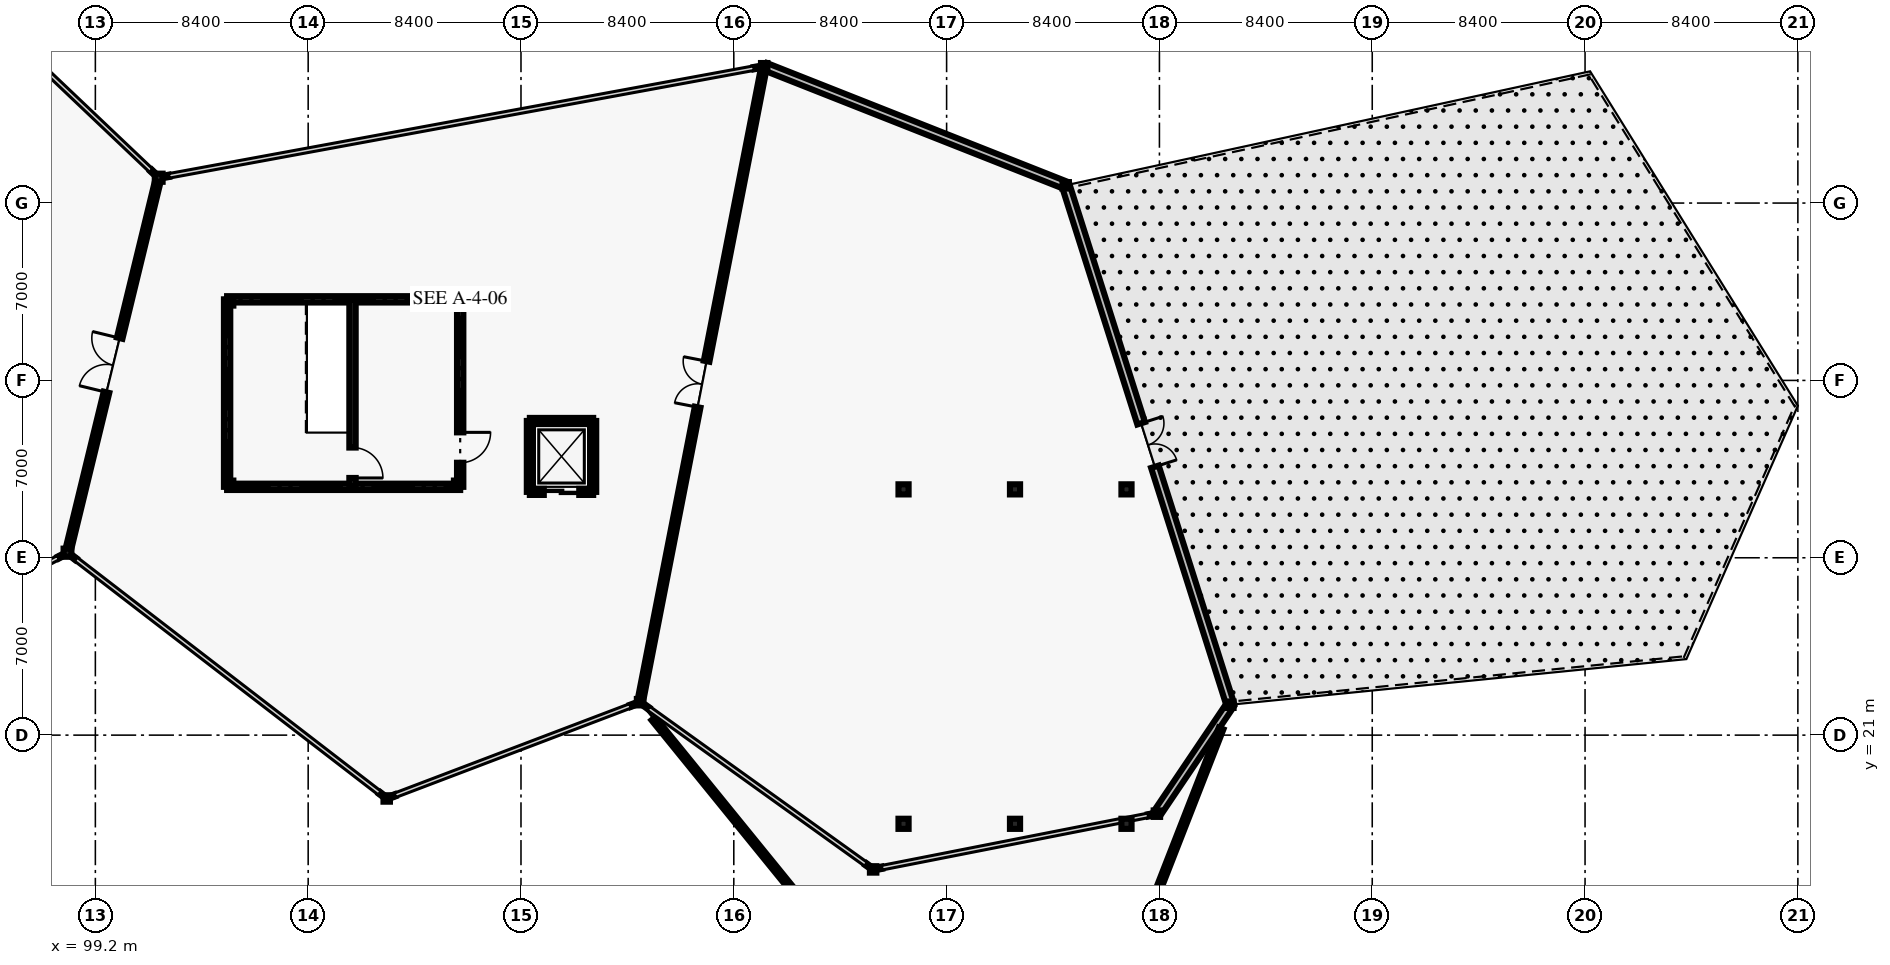
"""IFC4 building model, lengths in metres.
Left out: names, types, materials, properties, quantities, classifications, styles, units other than length and angle.
Written with IfcOpenShell. Run it as: python <this file> out.ifc"""

import sys

from ifc_helpers import new_model, si_unit, direction, frame, frame_2d, origin, origin_2d, place, context, subcontext, project, spatial, rectangle, i_section, extrude, element, fill, save


model = new_model("IFC4")
c1 = context("Model", 3, precision=1e-05, world=origin(), true_north=direction((0.0, 1.0)))
c2 = subcontext(c1, "Body", "Model", "MODEL_VIEW")
j1 = project(units=[si_unit("LENGTHUNIT", "METRE"), si_unit("PLANEANGLEUNIT", "RADIAN")], contexts=[c1])
p1 = place(None, origin())
s1 = spatial("IfcSite", under=j1, at=p1, CompositionType="ELEMENT")
p2 = place(p1, origin())
s2 = spatial("IfcBuilding", under=s1, at=p2, CompositionType="ELEMENT")
p3 = place(p2, frame((0.0, 0.0, 15.0)))
s3 = spatial("IfcBuildingStorey", under=s2, at=p3, CompositionType="ELEMENT", Elevation=15.0)
for number, where, z_axis, x_axis in (
    (1, (98.1, 28.2, 0.0), (0.0, 0.0, 1.0), (1.0, 0.0, 0.0)),
    (2, (101.7, 43.0, 0.0), (0.0, 0.0, 1.0), (1.0, 0.0, 0.0)),
):
    element("IfcColumn", number, at=place(p3, frame(where, z_axis=z_axis, x_axis=x_axis)), inside=s3, PredefinedType="COLUMN", context=c2, shape_type="SweptSolid", body=[
        extrude(i_section(OverallWidth=0.309, OverallDepth=0.321, WebThickness=0.014, FlangeThickness=0.022, FilletRadius=0.017, at=origin_2d()), origin(), (0.0, 0.0, 1.0), 4.8),
    ])
for number, where, z_axis, x_axis in (
    (3, (110.7, 18.5, 0.0), (0.0, 0.0, 1.0), (1.0, 0.0, 0.0)),
    (4, (120.7, 22.3, 0.0), (0.0, 0.0, 1.0), (1.0, 0.0, 0.0)),
    (5, (125.6, 47.4, 0.0), (0.0, 0.0, 1.0), (1.0, 0.0, 0.0)),
    (6, (129.9, 15.7, 0.0), (0.0, 0.0, 1.0), (1.0, 0.0, 0.0)),
    (7, (137.5, 42.7, 0.0), (0.0, 0.0, 1.0), (1.0, 0.0, 0.0)),
    (8, (141.1, 17.9, 0.0), (0.0, 0.0, 1.0), (1.0, 0.0, 0.0)),
    (9, (144.0, 22.2, 0.0), (0.0, 0.0, 1.0), (1.0, 0.0, 0.0)),
):
    element("IfcColumn", number, at=place(p3, frame(where, z_axis=z_axis, x_axis=x_axis)), inside=s3, PredefinedType="COLUMN", context=c2, shape_type="SweptSolid", body=[
        extrude(i_section(OverallWidth=0.254, OverallDepth=0.254, WebThickness=0.009, FlangeThickness=0.014, FilletRadius=0.013, at=origin_2d()), origin(), (0.0, 0.0, 1.0), 4.8),
    ])
for number, where, z_axis, x_axis in (
    (10, (131.1, 17.5, 0.0), (0.0, 0.0, 1.0), (1.0, 0.0, 0.0)),
    (11, (131.1, 30.7, 0.0), (0.0, 0.0, 1.0), (1.0, 0.0, 0.0)),
    (12, (135.5, 17.5, 0.0), (0.0, 0.0, 1.0), (1.0, 0.0, 0.0)),
    (13, (135.5, 30.7, 0.0), (0.0, 0.0, 1.0), (1.0, 0.0, 0.0)),
    (14, (139.9, 17.5, 0.0), (0.0, 0.0, 1.0), (1.0, 0.0, 0.0)),
    (15, (139.9, 30.7, 0.0), (0.0, 0.0, 1.0), (1.0, 0.0, 0.0)),
):
    element("IfcColumn", number, at=place(p3, frame(where, z_axis=z_axis, x_axis=x_axis)), inside=s3, PredefinedType="COLUMN", context=c2, shape_type="SweptSolid", body=[
        extrude(i_section(OverallWidth=0.4, OverallDepth=0.4, WebThickness=0.022, FlangeThickness=0.036, at=origin_2d()), origin(), (0.0, 0.0, 1.0), 4.8),
    ])
for number, where, z_axis, x_axis in (
    (16, (104.52, 30.92, 0.0), (0.0, 0.0, 1.0), (1.0, 0.0, 0.0)),
    (17, (113.48, 30.92, 0.0), (0.0, 0.0, 1.0), (1.0, 0.0, 0.0)),
    (18, (113.48, 38.08, 0.0), (0.0, 0.0, 1.0), (1.0, 0.0, 0.0)),
    (19, (104.52, 38.08, 0.0), (0.0, 0.0, 1.0), (1.0, 0.0, 0.0)),
):
    element("IfcColumn", number, at=place(p3, frame(where, z_axis=z_axis, x_axis=x_axis)), inside=s3, PredefinedType="COLUMN", context=c2, shape_type="SweptSolid", body=[
        extrude(i_section(OverallWidth=0.254, OverallDepth=0.254, WebThickness=0.009, FlangeThickness=0.014, FilletRadius=0.013, at=origin_2d()), origin(), (0.0, 0.0, 1.0), 4.8),
    ])
p4 = place(p3, frame((98.01, 28.152, 0.0), z_axis=(0.0, 0.0, 1.0), x_axis=(-0.885021600209, -0.465549962049, 0.0)))
e20 = element("IfcWall", 20, at=p4, inside=s3, PredefinedType="SOLIDWALL", context=c2, shape_type="SweptSolid", body=[
    extrude(rectangle(XDim=0.307, YDim=0.095, at=frame_2d((0.154, 0.0))), origin(), (0.0, 0.0, 1.0), 3.62),
])
p5 = place(p3, frame((101.403, 43.282, 0.0), z_axis=(0.0, 0.0, 1.0), x_axis=(0.726243974232, -0.687437044311, 0.0)))
e21 = element("IfcWall", 21, at=p5, inside=s3, PredefinedType="SOLIDWALL", context=c2, shape_type="SweptSolid", body=[
    extrude(rectangle(XDim=0.308, YDim=0.095, at=frame_2d((0.154, 0.0))), origin(), (0.0, 0.0, 1.0), 3.62),
])
p6 = place(p3, frame((110.667, 18.526, 0.0), z_axis=(0.0, 0.0, 1.0), x_axis=(-0.79356800352, 0.608481572268, 0.0)))
e22 = element("IfcWall", 22, at=p6, inside=s3, PredefinedType="SOLIDWALL", context=c2, shape_type="SweptSolid", body=[
    extrude(rectangle(XDim=0.307, YDim=0.095, at=frame_2d((0.154, 0.0))), origin(), (0.0, 0.0, 1.0), 3.62),
])
p7 = place(p3, frame((98.424, 27.95, 0.0), z_axis=(0.0, 0.0, 1.0), x_axis=(-0.793861838141, 0.608098168016, 0.0)))
e23 = element("IfcWall", 23, at=p7, inside=s3, PredefinedType="SOLIDWALL", context=c2, shape_type="SweptSolid", body=[
    extrude(rectangle(XDim=0.308, YDim=0.095, at=frame_2d((0.154, 0.0))), origin(), (0.0, 0.0, 1.0), 3.62),
])
p8 = place(p3, frame((120.605, 22.264, 0.0), z_axis=(0.0, 0.0, 1.0), x_axis=(-0.935413842844, -0.353554723651, 0.0)))
e24 = element("IfcWall", 24, at=p8, inside=s3, PredefinedType="SOLIDWALL", context=c2, shape_type="SweptSolid", body=[
    extrude(rectangle(XDim=0.308, YDim=0.095, at=frame_2d((0.154, 0.0))), origin(), (0.0, 0.0, 1.0), 3.62),
])
p9 = place(p3, frame((111.027, 18.624, 0.0), z_axis=(0.0, 0.0, 1.0), x_axis=(-0.935151489811, -0.354248064361, 0.0)))
e25 = element("IfcWall", 25, at=p9, inside=s3, PredefinedType="SOLIDWALL", context=c2, shape_type="SweptSolid", body=[
    extrude(rectangle(XDim=0.308, YDim=0.095, at=frame_2d((0.154, 0.0))), origin(), (0.0, 0.0, 1.0), 3.62),
])
for number, where, z_axis, x_axis in (
    (26, (101.8, 43.019, 0.0), (0.0, 0.0, 1.0), (0.984, 0.178, 0.0)),
    (27, (125.193, 47.325, 0.0), (0.0, 0.0, 1.0), (0.984, 0.178, 0.0)),
):
    element("IfcWall", number, at=place(p3, frame(where, z_axis=z_axis, x_axis=x_axis)), inside=s3, PredefinedType="SOLIDWALL", context=c2, shape_type="SweptSolid", body=[
        extrude(rectangle(XDim=0.308, YDim=0.095, at=frame_2d((0.154, 0.0))), origin(), (0.0, 0.0, 1.0), 3.62),
    ])
p10 = place(p3, frame((125.657, 47.378, 0.0), z_axis=(0.0, 0.0, 1.0), x_axis=(0.930071968125, -0.367377372884, 0.0)))
e28 = element("IfcWall", 28, at=p10, inside=s3, PredefinedType="SOLIDWALL", context=c2, shape_type="SweptSolid", body=[
    extrude(rectangle(XDim=12.733, YDim=0.315, at=frame_2d((6.367, 0.0))), origin(), (0.0, 0.0, 1.0), 3.62),
])
for number, where, z_axis, x_axis in (
    (29, (129.866, 15.724, 0.0), (0.0, 0.0, 1.0), (-0.812, 0.584, 0.0)),
    (30, (121.033, 22.061, 0.0), (0.0, 0.0, 1.0), (-0.812, 0.584, 0.0)),
):
    element("IfcWall", number, at=place(p3, frame(where, z_axis=z_axis, x_axis=x_axis)), inside=s3, PredefinedType="SOLIDWALL", context=c2, shape_type="SweptSolid", body=[
        extrude(rectangle(XDim=0.308, YDim=0.095, at=frame_2d((0.154, 0.0))), origin(), (0.0, 0.0, 1.0), 3.62),
    ])
for number, where, z_axis, x_axis in (
    (31, (141.059, 17.892, 0.0), (0.0, 0.0, 1.0), (-0.981, -0.192, 0.0)),
    (32, (130.243, 15.767, 0.0), (0.0, 0.0, 1.0), (-0.981, -0.192, 0.0)),
):
    element("IfcWall", number, at=place(p3, frame(where, z_axis=z_axis, x_axis=x_axis)), inside=s3, PredefinedType="SOLIDWALL", context=c2, shape_type="SweptSolid", body=[
        extrude(rectangle(XDim=0.308, YDim=0.095, at=frame_2d((0.154, 0.0))), origin(), (0.0, 0.0, 1.0), 3.62),
    ])
p11 = place(p3, frame((144.0, 22.2, 0.0), z_axis=(0.0, 0.0, 1.0), x_axis=(-0.559124361662, -0.829083800467, 0.0)))
e33 = element("IfcWall", 33, at=p11, inside=s3, PredefinedType="SOLIDWALL", context=c2, shape_type="SweptSolid", body=[
    extrude(rectangle(XDim=5.187, YDim=0.315, at=frame_2d((2.593, 0.0))), origin(), (0.0, 0.0, 1.0), 3.62),
])
p12 = place(p3, frame((137.5, 42.7, 0.0), z_axis=(0.0, 0.0, 1.0), x_axis=(0.302243860734, -0.953230637699, 0.0)))
e34 = element("IfcWall", 34, at=p12, inside=s3, PredefinedType="SOLIDWALL", context=c2, shape_type="SweptSolid", body=[
    extrude(rectangle(XDim=21.506, YDim=0.315, at=frame_2d((10.753, 0.0))), origin(), (0.0, 0.0, 1.0), 3.62),
])
p13 = place(p12, frame((9.853, 0.0, 0.0)))
e35 = element("IfcOpeningElement", 35, at=p13, cuts=e34, PredefinedType="OPENING", context=c2, shape_type="SweptSolid", body=[
    extrude(rectangle(XDim=1.8, YDim=2.25, at=frame_2d((0.9, 1.125))), frame((0.0, 0.167, 0.0), z_axis=(0.0, -1.0, 0.0), x_axis=(1.0, 0.0, 0.0)), (0.0, 0.0, 1.0), 0.335),
])
p14 = place(p3, frame((131.1, 9.5, 0.0), z_axis=(0.0, 0.0, 1.0), x_axis=(-0.630610236669, 0.776099690381, 0.0)))
e36 = element("IfcWall", 36, at=p14, inside=s3, PredefinedType="PARAPET", context=c2, shape_type="SweptSolid", body=[
    extrude(rectangle(XDim=15.656, YDim=0.195, at=frame_2d((7.828, 0.0))), origin(), (0.0, 0.0, 1.0), 0.95),
])
p15 = place(p3, frame((143.635, 21.265, 0.0), z_axis=(0.0, 0.0, 1.0), x_axis=(-0.363749317011, -0.931496878349, 0.0)))
e37 = element("IfcWall", 37, at=p15, inside=s3, PredefinedType="PARAPET", context=c2, shape_type="SweptSolid", body=[
    extrude(rectangle(XDim=10.268, YDim=0.195, at=frame_2d((5.134, 0.0))), origin(), (0.0, 0.0, 1.0), 0.95),
])
p16 = place(p3, frame((98.1, 28.2, 0.0), z_axis=(0.0, 0.0, 1.0), x_axis=(0.236341762997, 0.971669990822, 0.0)))
e38 = element("IfcWall", 38, at=p16, inside=s3, PredefinedType="SOLIDWALL", context=c2, shape_type="SweptSolid", body=[
    extrude(rectangle(XDim=15.231, YDim=0.225, at=frame_2d((7.616, 0.0))), origin(), (0.0, 0.0, 1.0), 4.02),
])
p17 = place(p16, frame((6.516, 0.0, 0.0)))
e39 = element("IfcOpeningElement", 39, at=p17, cuts=e38, PredefinedType="OPENING", context=c2, shape_type="SweptSolid", body=[
    extrude(rectangle(XDim=2.2, YDim=2.6, at=frame_2d((1.1, 1.3))), frame((0.0, 0.123, 0.0), z_axis=(0.0, -1.0, 0.0), x_axis=(1.0, 0.0, 0.0)), (0.0, 0.0, 1.0), 0.245),
])
p18 = place(p3, frame((120.7, 22.3, 0.0), z_axis=(0.0, 0.0, 1.0), x_axis=(0.191608827438, 0.981471373626, 0.0)))
e40 = element("IfcWall", 40, at=p18, inside=s3, PredefinedType="SOLIDWALL", context=c2, shape_type="SweptSolid", body=[
    extrude(rectangle(XDim=25.574, YDim=0.225, at=frame_2d((12.787, 0.0))), origin(), (0.0, 0.0, 1.0), 4.02),
])
p19 = place(p18, frame((11.862, 0.0, 0.0)))
e41 = element("IfcOpeningElement", 41, at=p19, cuts=e40, PredefinedType="OPENING", context=c2, shape_type="SweptSolid", body=[
    extrude(rectangle(XDim=1.85, YDim=2.4, at=frame_2d((0.925, 1.2))), frame((0.0, 0.123, 0.0), z_axis=(0.0, -1.0, 0.0), x_axis=(1.0, 0.0, 0.0)), (0.0, 0.0, 1.0), 0.245),
])
p20 = place(p3, frame((104.4, 30.8, 0.0), z_axis=(0.0, 0.0, 1.0), x_axis=(0.0, 1.0, 0.0)))
e42 = element("IfcWall", 42, at=p20, inside=s3, PredefinedType="SHEAR", context=c2, shape_type="SweptSolid", body=[
    extrude(rectangle(XDim=7.4, YDim=0.25, at=frame_2d((3.7, 0.0))), origin(), (0.0, 0.0, 1.0), 4.56),
])
for number, where, z_axis, x_axis in (
    (43, (104.4, 38.2, 0.0), (0.0, 0.0, 1.0), (1.0, 0.0, 0.0)),
    (44, (113.6, 30.8, 0.0), (0.0, 0.0, 1.0), (-1.0, 0.0, 0.0)),
):
    element("IfcWall", number, at=place(p3, frame(where, z_axis=z_axis, x_axis=x_axis)), inside=s3, PredefinedType="SHEAR", context=c2, shape_type="SweptSolid", body=[
        extrude(rectangle(XDim=9.2, YDim=0.25, at=frame_2d((4.6, 0.0))), origin(), (0.0, 0.0, 1.0), 4.56),
    ])
p21 = place(p3, frame((113.6, 38.2, 0.0), z_axis=(0.0, 0.0, 1.0), x_axis=(0.0, -1.0, 0.0)))
e45 = element("IfcWall", 45, at=p21, inside=s3, PredefinedType="SHEAR", context=c2, shape_type="SweptSolid", body=[
    extrude(rectangle(XDim=7.4, YDim=0.25, at=frame_2d((3.7, 0.0))), origin(), (0.0, 0.0, 1.0), 4.56),
])
p22 = place(p21, frame((5.25, 0.0, 0.0)))
e46 = element("IfcOpeningElement", 46, at=p22, cuts=e45, PredefinedType="OPENING", context=c2, shape_type="SweptSolid", body=[
    extrude(rectangle(XDim=1.2, YDim=2.2, at=frame_2d((0.6, 1.1))), frame((0.0, 0.135, 0.0), z_axis=(0.0, -1.0, 0.0), x_axis=(1.0, 0.0, 0.0)), (0.0, 0.0, 1.0), 0.27),
])
p23 = place(p3, frame((109.35, 38.2, 0.0), z_axis=(0.0, 0.0, 1.0), x_axis=(0.0, -1.0, 0.0)))
e47 = element("IfcWall", 47, at=p23, inside=s3, PredefinedType="SHEAR", context=c2, shape_type="SweptSolid", body=[
    extrude(rectangle(XDim=7.4, YDim=0.25, at=frame_2d((3.7, 0.0))), origin(), (0.0, 0.0, 1.0), 4.56),
])
p24 = place(p23, frame((5.85, 0.0, 0.0)))
e48 = element("IfcOpeningElement", 48, at=p24, cuts=e47, PredefinedType="OPENING", context=c2, shape_type="SweptSolid", body=[
    extrude(rectangle(XDim=1.2, YDim=2.2, at=frame_2d((0.6, 1.1))), frame((0.0, 0.135, 0.0), z_axis=(0.0, -1.0, 0.0), x_axis=(1.0, 0.0, 0.0)), (0.0, 0.0, 1.0), 0.27),
])
p25 = place(p3, frame((116.35, 33.4, 0.0), z_axis=(0.0, 0.0, 1.0), x_axis=(1.0, 0.0, 0.0)))
e49 = element("IfcWall", 49, at=p25, inside=s3, PredefinedType="SHEAR", context=c2, shape_type="SweptSolid", body=[
    extrude(rectangle(XDim=2.5, YDim=0.24, at=frame_2d((1.25, 0.0))), origin(), (0.0, 0.0, 1.0), 5.9),
])
for number, where, z_axis, x_axis in (
    (50, (118.85, 33.4, 0.0), (0.0, 0.0, 1.0), (0.0, -1.0, 0.0)),
    (51, (116.35, 30.6, 0.0), (0.0, 0.0, 1.0), (0.0, 1.0, 0.0)),
):
    element("IfcWall", number, at=place(p3, frame(where, z_axis=z_axis, x_axis=x_axis)), inside=s3, PredefinedType="SHEAR", context=c2, shape_type="SweptSolid", body=[
        extrude(rectangle(XDim=2.8, YDim=0.24, at=frame_2d((1.4, 0.0))), origin(), (0.0, 0.0, 1.0), 5.9),
    ])
p26 = place(p3, frame((118.85, 30.6, 0.0), z_axis=(0.0, 0.0, 1.0), x_axis=(-1.0, 0.0, 0.0)))
e52 = element("IfcWall", 52, at=p26, inside=s3, PredefinedType="SHEAR", context=c2, shape_type="SweptSolid", body=[
    extrude(rectangle(XDim=2.5, YDim=0.24, at=frame_2d((1.25, 0.0))), origin(), (0.0, 0.0, 1.0), 5.9),
])
p27 = place(p26, frame((0.55, 0.0, 0.0)))
e53 = element("IfcOpeningElement", 53, at=p27, cuts=e52, PredefinedType="OPENING", context=c2, shape_type="SweptSolid", body=[
    extrude(rectangle(XDim=1.4, YDim=2.3, at=frame_2d((0.7, 1.15))), frame((0.0, 0.13, 0.0), z_axis=(0.0, -1.0, 0.0), x_axis=(1.0, 0.0, 0.0)), (0.0, 0.0, 1.0), 0.26),
])
p28 = place(p13, origin())
e54 = element("IfcDoor", 54, at=p28, inside=s3, OperationType="DOUBLE_DOOR_SINGLE_SWING", PredefinedType="DOOR", context=c2, shape_type="SweptSolid", body=[
    extrude(rectangle(XDim=1.8, YDim=2.25, at=frame_2d((0.9, 1.125))), frame((0.0, 0.025, 0.0), z_axis=(0.0, -1.0, 0.0), x_axis=(1.0, 0.0, 0.0)), (0.0, 0.0, 1.0), 0.05),
])
fill(e35, e54)
p29 = place(p17, origin())
e55 = element("IfcDoor", 55, at=p29, inside=s3, OperationType="DOUBLE_DOOR_SINGLE_SWING", PredefinedType="DOOR", context=c2, shape_type="SweptSolid", body=[
    extrude(rectangle(XDim=2.2, YDim=2.6, at=frame_2d((1.1, 1.3))), frame((0.0, 0.025, 0.0), z_axis=(0.0, -1.0, 0.0), x_axis=(1.0, 0.0, 0.0)), (0.0, 0.0, 1.0), 0.05),
])
fill(e39, e55)
p30 = place(p19, origin())
e56 = element("IfcDoor", 56, at=p30, inside=s3, OperationType="DOUBLE_DOOR_SINGLE_SWING", PredefinedType="DOOR", context=c2, shape_type="SweptSolid", body=[
    extrude(rectangle(XDim=1.85, YDim=2.4, at=frame_2d((0.925, 1.2))), frame((0.0, 0.025, 0.0), z_axis=(0.0, -1.0, 0.0), x_axis=(1.0, 0.0, 0.0)), (0.0, 0.0, 1.0), 0.05),
])
fill(e41, e56)
p31 = place(p22, origin())
e57 = element("IfcDoor", 57, at=p31, inside=s3, OperationType="SINGLE_SWING_LEFT", PredefinedType="DOOR", context=c2, shape_type="SweptSolid", body=[
    extrude(rectangle(XDim=1.2, YDim=2.2, at=frame_2d((0.6, 1.1))), frame((0.0, 0.025, 0.0), z_axis=(0.0, -1.0, 0.0), x_axis=(1.0, 0.0, 0.0)), (0.0, 0.0, 1.0), 0.05),
])
fill(e46, e57)
p32 = place(p24, origin())
e58 = element("IfcDoor", 58, at=p32, inside=s3, OperationType="SINGLE_SWING_RIGHT", PredefinedType="DOOR", context=c2, shape_type="SweptSolid", body=[
    extrude(rectangle(XDim=1.2, YDim=2.2, at=frame_2d((0.6, 1.1))), frame((0.0, 0.025, 0.0), z_axis=(0.0, -1.0, 0.0), x_axis=(1.0, 0.0, 0.0)), (0.0, 0.0, 1.0), 0.05),
])
fill(e48, e58)
p33 = place(p27, origin())
e59 = element("IfcDoor", 59, at=p33, inside=s3, OperationType="SLIDING_TO_LEFT", PredefinedType="DOOR", context=c2, shape_type="SweptSolid", body=[
    extrude(rectangle(XDim=1.4, YDim=2.3, at=frame_2d((0.7, 1.15))), frame((0.0, 0.025, 0.0), z_axis=(0.0, -1.0, 0.0), x_axis=(1.0, 0.0, 0.0)), (0.0, 0.0, 1.0), 0.05),
])
fill(e53, e59)
save(model, sys.argv[1])
